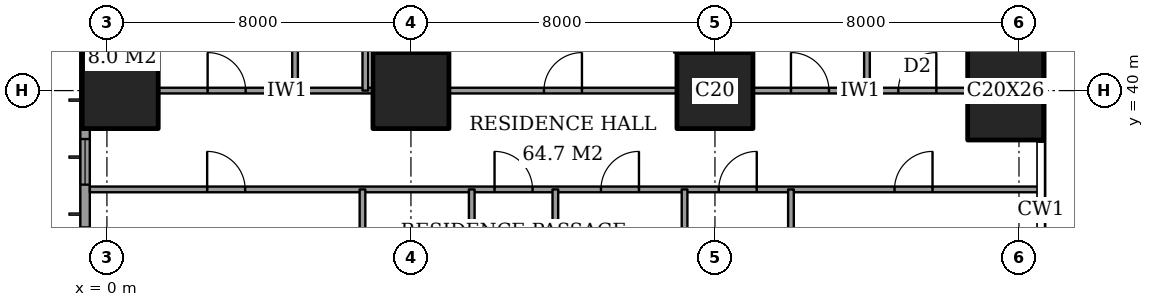
"""IFC4 building model, lengths in metres.
Left out: names, types, materials, properties, quantities, classifications, styles, units other than length and angle.
Written with IfcOpenShell. Run it as: python <this file> out.ifc"""

import sys

from ifc_helpers import new_model, si_unit, direction, frame, frame_2d, origin, origin_2d, place, context, subcontext, project, spatial, rectangle, extrude, element, fill, save


model = new_model("IFC4")
c1 = context("Model", 3, precision=1e-05, world=origin(), true_north=direction((0.0, 1.0)))
c2 = subcontext(c1, "Body", "Model", "MODEL_VIEW")
j1 = project(units=[si_unit("LENGTHUNIT", "METRE"), si_unit("PLANEANGLEUNIT", "RADIAN")], contexts=[c1])
p1 = place(None, origin())
s1 = spatial("IfcSite", under=j1, at=p1, CompositionType="ELEMENT")
p2 = place(p1, origin())
s2 = spatial("IfcBuilding", under=s1, at=p2, CompositionType="ELEMENT")
p3 = place(p2, frame((0.0, 0.0, 58.4)))
s3 = spatial("IfcBuildingStorey", under=s2, at=p3, CompositionType="ELEMENT", Elevation=58.4)
for number, where, z_axis, x_axis in (
    (1, (0.35, 40.0, 0.0), (0.0, 0.0, 1.0), (1.0, 0.0, 0.0)),
    (2, (8.0, 40.0, 0.0), (0.0, 0.0, 1.0), (1.0, 0.0, 0.0)),
    (3, (16.0, 40.0, 0.0), (0.0, 0.0, 1.0), (1.0, 0.0, 0.0)),
):
    element("IfcColumn", number, at=place(p3, frame(where, z_axis=z_axis, x_axis=x_axis)), inside=s3, PredefinedType="COLUMN", context=c2, shape_type="SweptSolid", body=[
        extrude(rectangle(XDim=2.0, YDim=2.0, at=origin_2d()), origin(), (0.0, 0.0, 1.0), 3.6),
    ])
p4 = place(p3, frame((23.65, 40.0, 0.0), z_axis=(0.0, 0.0, 1.0), x_axis=(1.0, 0.0, 0.0)))
e4 = element("IfcColumn", 4, at=p4, inside=s3, PredefinedType="COLUMN", context=c2, shape_type="SweptSolid", body=[
    extrude(rectangle(XDim=2.0, YDim=2.6, at=origin_2d()), origin(), (0.0, 0.0, 1.0), 3.6),
])
p5 = place(p3, frame((-0.575, 44.825, 0.0), z_axis=(0.0, 0.0, 1.0), x_axis=(0.0, -1.0, 0.0)))
e5 = element("IfcWall", 5, at=p5, inside=s3, PredefinedType="SOLIDWALL", context=c2, shape_type="SweptSolid", body=[
    extrude(rectangle(XDim=41.65, YDim=0.25, at=frame_2d((20.825, 0.0))), origin(), (0.0, 0.0, 1.0), 3.6),
])
p6 = place(p5, frame((0.775, 0.0, 0.6)))
e6 = element("IfcOpeningElement", 6, at=p6, cuts=e5, PredefinedType="OPENING", context=c2, shape_type="SweptSolid", body=[
    extrude(rectangle(XDim=2.4, YDim=2.0, at=frame_2d((1.2, 1.0))), frame((0.0, 0.135, 0.0), z_axis=(0.0, -1.0, 0.0), x_axis=(1.0, 0.0, 0.0)), (0.0, 0.0, 1.0), 0.27),
])
p7 = place(p5, frame((6.1, 0.0, 0.6)))
e7 = element("IfcOpeningElement", 7, at=p7, cuts=e5, PredefinedType="OPENING", context=c2, shape_type="SweptSolid", body=[
    extrude(rectangle(XDim=1.2, YDim=2.0, at=frame_2d((0.6, 1.0))), frame((0.0, 0.135, 0.0), z_axis=(0.0, -1.0, 0.0), x_axis=(1.0, 0.0, 0.0)), (0.0, 0.0, 1.0), 0.27),
])
p8 = place(p5, frame((8.425, 0.0, 0.6)))
e8 = element("IfcOpeningElement", 8, at=p8, cuts=e5, PredefinedType="OPENING", context=c2, shape_type="SweptSolid", body=[
    extrude(rectangle(XDim=2.4, YDim=2.0, at=frame_2d((1.2, 1.0))), frame((0.0, 0.135, 0.0), z_axis=(0.0, -1.0, 0.0), x_axis=(1.0, 0.0, 0.0)), (0.0, 0.0, 1.0), 0.27),
])
p9 = place(p5, frame((15.625, 0.0, 0.6)))
e9 = element("IfcOpeningElement", 9, at=p9, cuts=e5, PredefinedType="OPENING", context=c2, shape_type="SweptSolid", body=[
    extrude(rectangle(XDim=2.4, YDim=2.0, at=frame_2d((1.2, 1.0))), frame((0.0, 0.135, 0.0), z_axis=(0.0, -1.0, 0.0), x_axis=(1.0, 0.0, 0.0)), (0.0, 0.0, 1.0), 0.27),
])
p10 = place(p5, frame((23.625, 0.0, 0.6)))
e10 = element("IfcOpeningElement", 10, at=p10, cuts=e5, PredefinedType="OPENING", context=c2, shape_type="SweptSolid", body=[
    extrude(rectangle(XDim=2.4, YDim=2.0, at=frame_2d((1.2, 1.0))), frame((0.0, 0.135, 0.0), z_axis=(0.0, -1.0, 0.0), x_axis=(1.0, 0.0, 0.0)), (0.0, 0.0, 1.0), 0.27),
])
p11 = place(p5, frame((30.825, 0.0, 0.6)))
e11 = element("IfcOpeningElement", 11, at=p11, cuts=e5, PredefinedType="OPENING", context=c2, shape_type="SweptSolid", body=[
    extrude(rectangle(XDim=2.4, YDim=2.0, at=frame_2d((1.2, 1.0))), frame((0.0, 0.135, 0.0), z_axis=(0.0, -1.0, 0.0), x_axis=(1.0, 0.0, 0.0)), (0.0, 0.0, 1.0), 0.27),
])
p12 = place(p5, frame((34.5, 0.0, 0.6)))
e12 = element("IfcOpeningElement", 12, at=p12, cuts=e5, PredefinedType="OPENING", context=c2, shape_type="SweptSolid", body=[
    extrude(rectangle(XDim=1.2, YDim=2.0, at=frame_2d((0.6, 1.0))), frame((0.0, 0.135, 0.0), z_axis=(0.0, -1.0, 0.0), x_axis=(1.0, 0.0, 0.0)), (0.0, 0.0, 1.0), 0.27),
])
p13 = place(p5, frame((38.475, 0.0, 0.6)))
e13 = element("IfcOpeningElement", 13, at=p13, cuts=e5, PredefinedType="OPENING", context=c2, shape_type="SweptSolid", body=[
    extrude(rectangle(XDim=2.4, YDim=2.0, at=frame_2d((1.2, 1.0))), frame((0.0, 0.135, 0.0), z_axis=(0.0, -1.0, 0.0), x_axis=(1.0, 0.0, 0.0)), (0.0, 0.0, 1.0), 0.27),
])
p14 = place(p3, frame((-0.45, 37.4, 0.0), z_axis=(0.0, 0.0, 1.0), x_axis=(1.0, 0.0, 0.0)))
e14 = element("IfcWall", 14, at=p14, inside=s3, PredefinedType="PARTITIONING", context=c2, shape_type="SweptSolid", body=[
    extrude(rectangle(XDim=25.011, YDim=0.15, at=frame_2d((12.505, 0.0))), origin(), (0.0, 0.0, 1.0), 3.35),
])
p15 = place(p14, frame((10.65, 0.0, 0.0)))
e15 = element("IfcOpeningElement", 15, at=p15, cuts=e14, PredefinedType="OPENING", context=c2, shape_type="SweptSolid", body=[
    extrude(rectangle(XDim=1.0, YDim=2.1, at=frame_2d((0.5, 1.05))), frame((0.0, 0.085, 0.0), z_axis=(0.0, -1.0, 0.0), x_axis=(1.0, 0.0, 0.0)), (0.0, 0.0, 1.0), 0.17),
])
p16 = place(p14, frame((3.087, 0.0, 0.0)))
e16 = element("IfcOpeningElement", 16, at=p16, cuts=e14, PredefinedType="OPENING", context=c2, shape_type="SweptSolid", body=[
    extrude(rectangle(XDim=1.0, YDim=2.1, at=frame_2d((0.5, 1.05))), frame((0.0, 0.085, 0.0), z_axis=(0.0, -1.0, 0.0), x_axis=(1.0, 0.0, 0.0)), (0.0, 0.0, 1.0), 0.17),
])
p17 = place(p14, frame((13.45, 0.0, 0.0)))
e17 = element("IfcOpeningElement", 17, at=p17, cuts=e14, PredefinedType="OPENING", context=c2, shape_type="SweptSolid", body=[
    extrude(rectangle(XDim=1.0, YDim=2.1, at=frame_2d((0.5, 1.05))), frame((0.0, 0.085, 0.0), z_axis=(0.0, -1.0, 0.0), x_axis=(1.0, 0.0, 0.0)), (0.0, 0.0, 1.0), 0.17),
])
p18 = place(p14, frame((16.55, 0.0, 0.0)))
e18 = element("IfcOpeningElement", 18, at=p18, cuts=e14, PredefinedType="OPENING", context=c2, shape_type="SweptSolid", body=[
    extrude(rectangle(XDim=1.0, YDim=2.1, at=frame_2d((0.5, 1.05))), frame((0.0, 0.085, 0.0), z_axis=(0.0, -1.0, 0.0), x_axis=(1.0, 0.0, 0.0)), (0.0, 0.0, 1.0), 0.17),
])
p19 = place(p14, frame((21.175, 0.0, 0.0)))
e19 = element("IfcOpeningElement", 19, at=p19, cuts=e14, PredefinedType="OPENING", context=c2, shape_type="SweptSolid", body=[
    extrude(rectangle(XDim=1.0, YDim=2.1, at=frame_2d((0.5, 1.05))), frame((0.0, 0.085, 0.0), z_axis=(0.0, -1.0, 0.0), x_axis=(1.0, 0.0, 0.0)), (0.0, 0.0, 1.0), 0.17),
])
p20 = place(p3, frame((1.35, 40.0, 0.0), z_axis=(0.0, 0.0, 1.0), x_axis=(1.0, 0.0, 0.0)))
e20 = element("IfcWall", 20, at=p20, inside=s3, PredefinedType="PARTITIONING", context=c2, shape_type="SweptSolid", body=[
    extrude(rectangle(XDim=5.65, YDim=0.15, at=frame_2d((2.825, 0.0))), origin(), (0.0, 0.0, 1.0), 3.35),
])
p21 = place(p20, frame((1.3, 0.0, 0.0)))
e21 = element("IfcOpeningElement", 21, at=p21, cuts=e20, PredefinedType="OPENING", context=c2, shape_type="SweptSolid", body=[
    extrude(rectangle(XDim=1.0, YDim=2.1, at=frame_2d((0.5, 1.05))), frame((0.0, 0.085, 0.0), z_axis=(0.0, -1.0, 0.0), x_axis=(1.0, 0.0, 0.0)), (0.0, 0.0, 1.0), 0.17),
])
p22 = place(p3, frame((9.0, 40.0, 0.0), z_axis=(0.0, 0.0, 1.0), x_axis=(1.0, 0.0, 0.0)))
e22 = element("IfcWall", 22, at=p22, inside=s3, PredefinedType="PARTITIONING", context=c2, shape_type="SweptSolid", body=[
    extrude(rectangle(XDim=6.0, YDim=0.15, at=frame_2d((3.0, 0.0))), origin(), (0.0, 0.0, 1.0), 3.35),
])
p23 = place(p22, frame((2.5, 0.0, 0.0)))
e23 = element("IfcOpeningElement", 23, at=p23, cuts=e22, PredefinedType="OPENING", context=c2, shape_type="SweptSolid", body=[
    extrude(rectangle(XDim=1.0, YDim=2.1, at=frame_2d((0.5, 1.05))), frame((0.0, 0.085, 0.0), z_axis=(0.0, -1.0, 0.0), x_axis=(1.0, 0.0, 0.0)), (0.0, 0.0, 1.0), 0.17),
])
p24 = place(p3, frame((17.0, 40.0, 0.0), z_axis=(0.0, 0.0, 1.0), x_axis=(1.0, 0.0, 0.0)))
e24 = element("IfcWall", 24, at=p24, inside=s3, PredefinedType="PARTITIONING", context=c2, shape_type="SweptSolid", body=[
    extrude(rectangle(XDim=5.65, YDim=0.15, at=frame_2d((2.825, 0.0))), origin(), (0.0, 0.0, 1.0), 3.35),
])
p25 = place(p24, frame((1.0, 0.0, 0.0)))
e25 = element("IfcOpeningElement", 25, at=p25, cuts=e24, PredefinedType="OPENING", context=c2, shape_type="SweptSolid", body=[
    extrude(rectangle(XDim=1.0, YDim=2.1, at=frame_2d((0.5, 1.05))), frame((0.0, 0.085, 0.0), z_axis=(0.0, -1.0, 0.0), x_axis=(1.0, 0.0, 0.0)), (0.0, 0.0, 1.0), 0.17),
])
p26 = place(p24, frame((3.825, 0.0, 0.0)))
e26 = element("IfcOpeningElement", 26, at=p26, cuts=e24, PredefinedType="OPENING", context=c2, shape_type="SweptSolid", body=[
    extrude(rectangle(XDim=1.0, YDim=2.1, at=frame_2d((0.5, 1.05))), frame((0.0, 0.085, 0.0), z_axis=(0.0, -1.0, 0.0), x_axis=(1.0, 0.0, 0.0)), (0.0, 0.0, 1.0), 0.17),
])
p27 = place(p3, frame((4.95, 40.0, 0.0), z_axis=(0.0, 0.0, 1.0), x_axis=(0.0, 1.0, 0.0)))
e27 = element("IfcWall", 27, at=p27, inside=s3, PredefinedType="PARTITIONING", context=c2, shape_type="SweptSolid", body=[
    extrude(rectangle(XDim=8.45, YDim=0.15, at=frame_2d((4.225, 0.0))), origin(), (0.0, 0.0, 1.0), 3.35),
])
p28 = place(p27, frame((3.775, 0.0, 0.0)))
e28 = element("IfcOpeningElement", 28, at=p28, cuts=e27, PredefinedType="OPENING", context=c2, shape_type="SweptSolid", body=[
    extrude(rectangle(XDim=0.9, YDim=2.1, at=frame_2d((0.45, 1.05))), frame((0.0, 0.085, 0.0), z_axis=(0.0, -1.0, 0.0), x_axis=(1.0, 0.0, 0.0)), (0.0, 0.0, 1.0), 0.17),
])
p29 = place(p3, frame((6.725, 33.2, 0.0), z_axis=(0.0, 0.0, 1.0), x_axis=(0.0, 1.0, 0.0)))
e29 = element("IfcWall", 29, at=p29, inside=s3, PredefinedType="PARTITIONING", context=c2, shape_type="SweptSolid", body=[
    extrude(rectangle(XDim=4.2, YDim=0.15, at=frame_2d((2.1, 0.0))), origin(), (0.0, 0.0, 1.0), 3.35),
])
p30 = place(p29, frame((2.1, 0.0, 0.0)))
e30 = element("IfcOpeningElement", 30, at=p30, cuts=e29, PredefinedType="OPENING", context=c2, shape_type="SweptSolid", body=[
    extrude(rectangle(XDim=0.9, YDim=2.1, at=frame_2d((0.45, 1.05))), frame((0.0, 0.085, 0.0), z_axis=(0.0, -1.0, 0.0), x_axis=(1.0, 0.0, 0.0)), (0.0, 0.0, 1.0), 0.17),
])
p31 = place(p3, frame((6.8, 40.0, 0.0), z_axis=(0.0, 0.0, 1.0), x_axis=(0.0, 1.0, 0.0)))
e31 = element("IfcWall", 31, at=p31, inside=s3, PredefinedType="PARTITIONING", context=c2, shape_type="SweptSolid", body=[
    extrude(rectangle(XDim=8.45, YDim=0.15, at=frame_2d((4.225, 0.0))), origin(), (0.0, 0.0, 1.0), 3.35),
])
p32 = place(p3, frame((9.6, 28.0, 0.0), z_axis=(0.0, 0.0, 1.0), x_axis=(0.0, 1.0, 0.0)))
e32 = element("IfcWall", 32, at=p32, inside=s3, PredefinedType="PARTITIONING", context=c2, shape_type="SweptSolid", body=[
    extrude(rectangle(XDim=9.4, YDim=0.15, at=frame_2d((4.7, 0.0))), origin(), (0.0, 0.0, 1.0), 3.35),
])
p33 = place(p32, frame((0.5, 0.0, 0.0)))
e33 = element("IfcOpeningElement", 33, at=p33, cuts=e32, PredefinedType="OPENING", context=c2, shape_type="SweptSolid", body=[
    extrude(rectangle(XDim=1.0, YDim=2.1, at=frame_2d((0.5, 1.05))), frame((0.0, 0.085, 0.0), z_axis=(0.0, -1.0, 0.0), x_axis=(1.0, 0.0, 0.0)), (0.0, 0.0, 1.0), 0.17),
])
p34 = place(p3, frame((11.8, 30.0, 0.0), z_axis=(0.0, 0.0, 1.0), x_axis=(0.0, 1.0, 0.0)))
e34 = element("IfcWall", 34, at=p34, inside=s3, PredefinedType="PARTITIONING", context=c2, shape_type="SweptSolid", body=[
    extrude(rectangle(XDim=7.4, YDim=0.15, at=frame_2d((3.7, 0.0))), origin(), (0.0, 0.0, 1.0), 3.35),
])
p35 = place(p3, frame((15.2, 33.2, 0.0), z_axis=(0.0, 0.0, 1.0), x_axis=(0.0, 1.0, 0.0)))
e35 = element("IfcWall", 35, at=p35, inside=s3, PredefinedType="PARTITIONING", context=c2, shape_type="SweptSolid", body=[
    extrude(rectangle(XDim=4.2, YDim=0.15, at=frame_2d((2.1, 0.0))), origin(), (0.0, 0.0, 1.0), 3.35),
])
p36 = place(p3, frame((18.0, 31.4, 0.0), z_axis=(0.0, 0.0, 1.0), x_axis=(0.0, 1.0, 0.0)))
e36 = element("IfcWall", 36, at=p36, inside=s3, PredefinedType="PARTITIONING", context=c2, shape_type="SweptSolid", body=[
    extrude(rectangle(XDim=6.0, YDim=0.15, at=frame_2d((3.0, 0.0))), origin(), (0.0, 0.0, 1.0), 3.35),
])
p37 = place(p3, frame((20.0, 40.0, 0.0), z_axis=(0.0, 0.0, 1.0), x_axis=(0.0, 1.0, 0.0)))
e37 = element("IfcWall", 37, at=p37, inside=s3, PredefinedType="PARTITIONING", context=c2, shape_type="SweptSolid", body=[
    extrude(rectangle(XDim=8.45, YDim=0.15, at=frame_2d((4.225, 0.0))), origin(), (0.0, 0.0, 1.0), 3.35),
])
p38 = place(p7, origin())
e38 = element("IfcWindow", 38, at=p38, inside=s3, PartitioningType="SINGLE_PANEL", PredefinedType="WINDOW", context=c2, shape_type="SweptSolid", body=[
    extrude(rectangle(XDim=1.2, YDim=2.0, at=frame_2d((0.6, 1.0))), frame((0.0, 0.03, 0.0), z_axis=(0.0, -1.0, 0.0), x_axis=(1.0, 0.0, 0.0)), (0.0, 0.0, 1.0), 0.06),
])
fill(e7, e38)
p39 = place(p21, origin())
e39 = element("IfcDoor", 39, at=p39, inside=s3, OperationType="SINGLE_SWING_RIGHT", PredefinedType="DOOR", context=c2, shape_type="SweptSolid", body=[
    extrude(rectangle(XDim=1.0, YDim=2.1, at=frame_2d((0.5, 1.05))), frame((0.0, 0.025, 0.0), z_axis=(0.0, -1.0, 0.0), x_axis=(1.0, 0.0, 0.0)), (0.0, 0.0, 1.0), 0.05),
])
fill(e21, e39)
p40 = place(p23, origin())
e40 = element("IfcDoor", 40, at=p40, inside=s3, OperationType="SINGLE_SWING_LEFT", PredefinedType="DOOR", context=c2, shape_type="SweptSolid", body=[
    extrude(rectangle(XDim=1.0, YDim=2.1, at=frame_2d((0.5, 1.05))), frame((0.0, 0.025, 0.0), z_axis=(0.0, -1.0, 0.0), x_axis=(1.0, 0.0, 0.0)), (0.0, 0.0, 1.0), 0.05),
])
fill(e23, e40)
p41 = place(p25, origin())
e41 = element("IfcDoor", 41, at=p41, inside=s3, OperationType="SINGLE_SWING_RIGHT", PredefinedType="DOOR", context=c2, shape_type="SweptSolid", body=[
    extrude(rectangle(XDim=1.0, YDim=2.1, at=frame_2d((0.5, 1.05))), frame((0.0, 0.025, 0.0), z_axis=(0.0, -1.0, 0.0), x_axis=(1.0, 0.0, 0.0)), (0.0, 0.0, 1.0), 0.05),
])
fill(e25, e41)
p42 = place(p26, origin())
e42 = element("IfcDoor", 42, at=p42, inside=s3, OperationType="SINGLE_SWING_LEFT", PredefinedType="DOOR", context=c2, shape_type="SweptSolid", body=[
    extrude(rectangle(XDim=1.0, YDim=2.1, at=frame_2d((0.5, 1.05))), frame((0.0, 0.025, 0.0), z_axis=(0.0, -1.0, 0.0), x_axis=(1.0, 0.0, 0.0)), (0.0, 0.0, 1.0), 0.05),
])
fill(e26, e42)
p43 = place(p15, origin())
e43 = element("IfcDoor", 43, at=p43, inside=s3, OperationType="SINGLE_SWING_RIGHT", PredefinedType="DOOR", context=c2, shape_type="SweptSolid", body=[
    extrude(rectangle(XDim=1.0, YDim=2.1, at=frame_2d((0.5, 1.05))), frame((0.0, 0.025, 0.0), z_axis=(0.0, -1.0, 0.0), x_axis=(1.0, 0.0, 0.0)), (0.0, 0.0, 1.0), 0.05),
])
fill(e15, e43)
p44 = place(p16, origin())
e44 = element("IfcDoor", 44, at=p44, inside=s3, OperationType="SINGLE_SWING_RIGHT", PredefinedType="DOOR", context=c2, shape_type="SweptSolid", body=[
    extrude(rectangle(XDim=1.0, YDim=2.1, at=frame_2d((0.5, 1.05))), frame((0.0, 0.025, 0.0), z_axis=(0.0, -1.0, 0.0), x_axis=(1.0, 0.0, 0.0)), (0.0, 0.0, 1.0), 0.05),
])
fill(e16, e44)
p45 = place(p17, origin())
e45 = element("IfcDoor", 45, at=p45, inside=s3, OperationType="SINGLE_SWING_LEFT", PredefinedType="DOOR", context=c2, shape_type="SweptSolid", body=[
    extrude(rectangle(XDim=1.0, YDim=2.1, at=frame_2d((0.5, 1.05))), frame((0.0, 0.025, 0.0), z_axis=(0.0, -1.0, 0.0), x_axis=(1.0, 0.0, 0.0)), (0.0, 0.0, 1.0), 0.05),
])
fill(e17, e45)
p46 = place(p18, origin())
e46 = element("IfcDoor", 46, at=p46, inside=s3, OperationType="SINGLE_SWING_LEFT", PredefinedType="DOOR", context=c2, shape_type="SweptSolid", body=[
    extrude(rectangle(XDim=1.0, YDim=2.1, at=frame_2d((0.5, 1.05))), frame((0.0, 0.025, 0.0), z_axis=(0.0, -1.0, 0.0), x_axis=(1.0, 0.0, 0.0)), (0.0, 0.0, 1.0), 0.05),
])
fill(e18, e46)
p47 = place(p19, origin())
e47 = element("IfcDoor", 47, at=p47, inside=s3, OperationType="SINGLE_SWING_LEFT", PredefinedType="DOOR", context=c2, shape_type="SweptSolid", body=[
    extrude(rectangle(XDim=1.0, YDim=2.1, at=frame_2d((0.5, 1.05))), frame((0.0, 0.025, 0.0), z_axis=(0.0, -1.0, 0.0), x_axis=(1.0, 0.0, 0.0)), (0.0, 0.0, 1.0), 0.05),
])
fill(e19, e47)
save(model, sys.argv[1])
